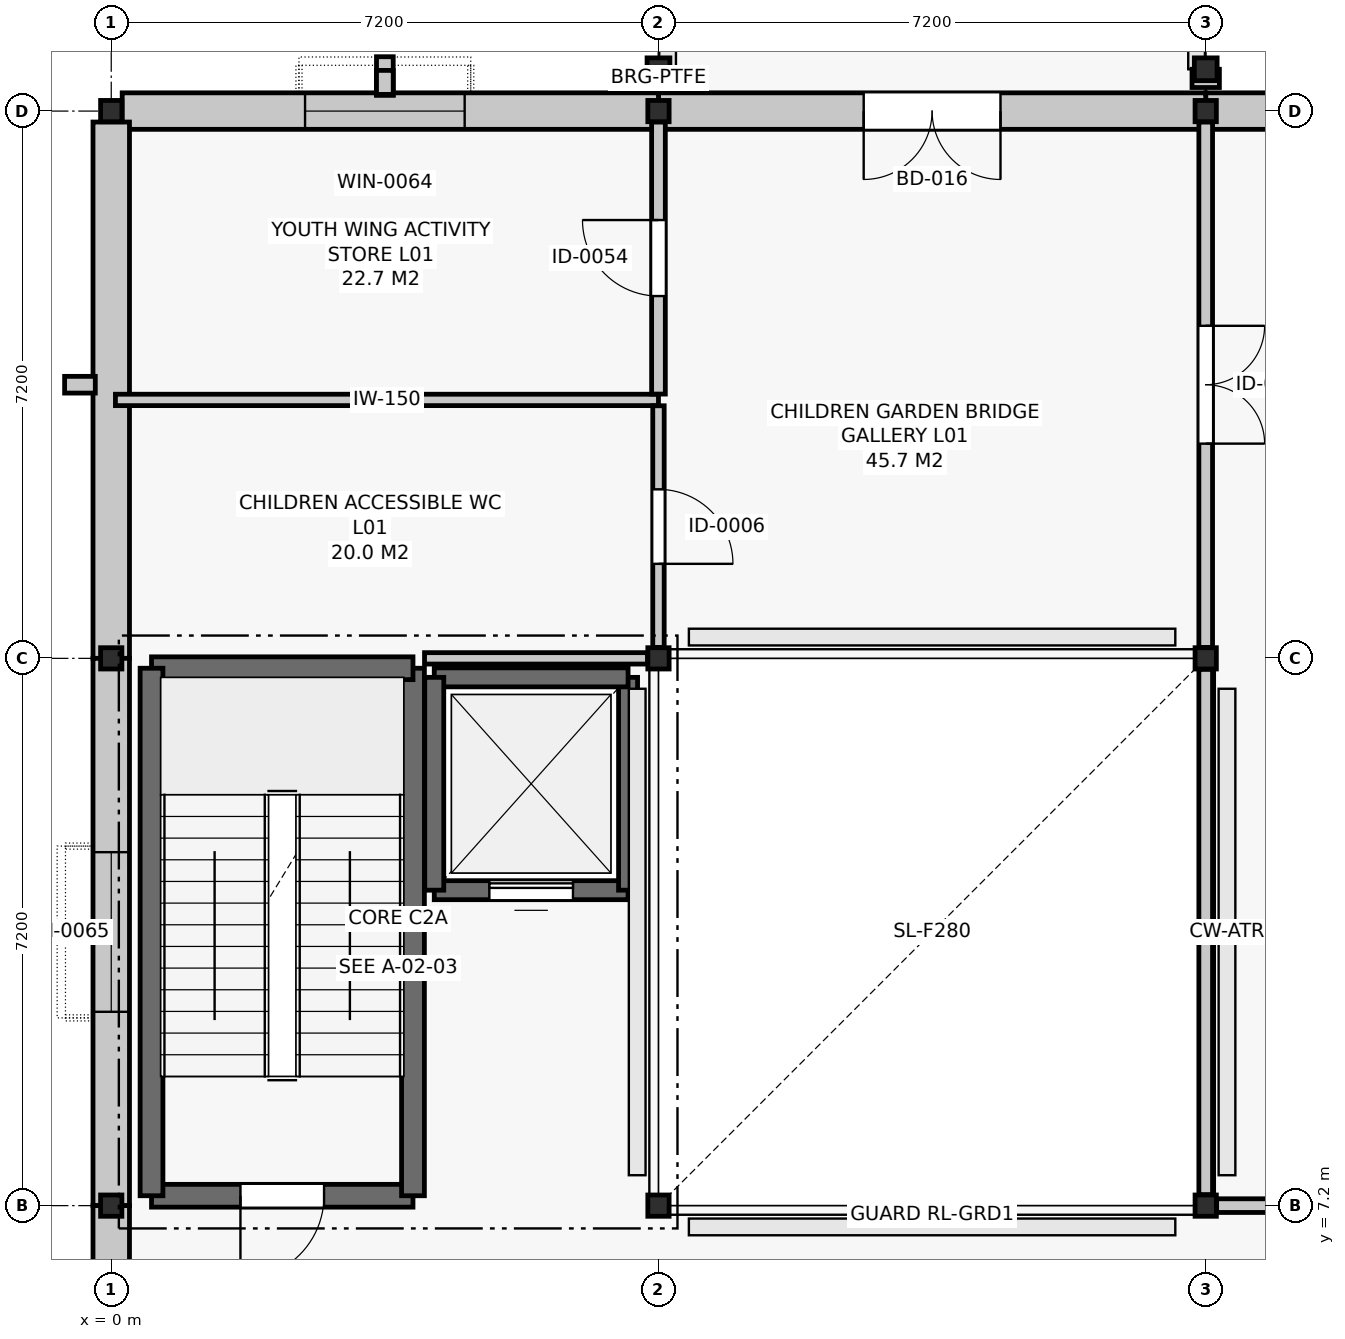
"""IFC4 building model, lengths in metres.
Left out: names, types, materials, properties, quantities, classifications, styles, units other than length and angle.
Written with IfcOpenShell. Run it as: python <this file> out.ifc"""

import sys

from ifc_helpers import new_model, si_unit, direction, frame, frame_2d, origin, origin_2d, place, context, subcontext, project, spatial, rectangle, i_section, extrude, element, fill, save


model = new_model("IFC4")
c1 = context("Model", 3, precision=1e-05, world=origin(), true_north=direction((0.0, 1.0)))
c2 = subcontext(c1, "Body", "Model", "MODEL_VIEW")
j1 = project(units=[si_unit("LENGTHUNIT", "METRE"), si_unit("PLANEANGLEUNIT", "RADIAN")], contexts=[c1])
p1 = place(None, origin())
s1 = spatial("IfcSite", under=j1, at=p1, CompositionType="ELEMENT")
p2 = place(p1, origin())
s2 = spatial("IfcBuilding", under=s1, at=p2, CompositionType="ELEMENT")
p3 = place(p2, frame((0.0, 0.0, 5.4)))
s3 = spatial("IfcBuildingStorey", under=s2, at=p3, CompositionType="ELEMENT", Elevation=5.4)
for number, where, z_axis, x_axis in (
    (1, (0.0, 7.2, 0.0), (0.0, 0.0, 1.0), (1.0, 0.0, 0.0)),
    (2, (0.0, 14.4, 0.0), (0.0, 0.0, 1.0), (1.0, 0.0, 0.0)),
    (3, (0.0, 21.6, 0.0), (0.0, 0.0, 1.0), (1.0, 0.0, 0.0)),
    (4, (7.2, 7.2, 0.0), (0.0, 0.0, 1.0), (1.0, 0.0, 0.0)),
    (5, (7.2, 14.4, 0.0), (0.0, 0.0, 1.0), (1.0, 0.0, 0.0)),
    (6, (7.2, 21.6, 0.0), (0.0, 0.0, 1.0), (1.0, 0.0, 0.0)),
    (7, (14.4, 7.2, 0.0), (0.0, 0.0, 1.0), (1.0, 0.0, 0.0)),
    (8, (14.4, 14.4, 0.0), (0.0, 0.0, 1.0), (1.0, 0.0, 0.0)),
    (9, (14.4, 21.6, 0.0), (0.0, 0.0, 1.0), (1.0, 0.0, 0.0)),
):
    element("IfcColumn", number, at=place(p3, frame(where, z_axis=z_axis, x_axis=x_axis)), inside=s3, PredefinedType="COLUMN", context=c2, shape_type="SweptSolid", body=[
        extrude(i_section(OverallWidth=0.28, OverallDepth=0.28, WebThickness=0.01, FlangeThickness=0.018, FilletRadius=0.024, at=origin_2d()), origin(), (0.0, 0.0, 1.0), 4.8),
    ])
for number, where, z_axis, x_axis in (
    (10, (7.2, 22.15, 0.0), (0.0, 0.0, 1.0), (1.0, 0.0, 0.0)),
    (11, (14.4, 22.15, 0.0), (0.0, 0.0, 1.0), (1.0, 0.0, 0.0)),
):
    element("IfcColumn", number, at=place(p3, frame(where, z_axis=z_axis, x_axis=x_axis)), inside=s3, PredefinedType="COLUMN", context=c2, shape_type="SweptSolid", body=[
        extrude(i_section(OverallWidth=0.3, OverallDepth=0.3, WebThickness=0.011, FlangeThickness=0.019, FilletRadius=0.027, at=origin_2d()), origin(), (0.0, 0.0, 1.0), 4.8),
    ])
p4 = place(p3, frame((21.6, 21.6, 0.0), z_axis=(0.0, 0.0, 1.0), x_axis=(-1.0, 0.0, 0.0)))
e12 = element("IfcWall", 12, at=p4, inside=s3, PredefinedType="SOLIDWALL", context=c2, shape_type="SweptSolid", body=[
    extrude(rectangle(XDim=7.2, YDim=0.48, at=frame_2d((3.6, 0.0))), origin(), (0.0, 0.0, 1.0), 3.8),
])
p5 = place(p4, frame((2.55, 0.0, 0.9)))
e13 = element("IfcOpeningElement", 13, at=p5, cuts=e12, PredefinedType="OPENING", context=c2, shape_type="SweptSolid", body=[
    extrude(rectangle(XDim=2.1, YDim=2.1, at=frame_2d((1.05, 1.05))), frame((0.0, 0.252, 0.0), z_axis=(0.0, -1.0, 0.0), x_axis=(1.0, 0.0, 0.0)), (0.0, 0.0, 1.0), 0.504),
])
p6 = place(p3, frame((14.4, 21.6, 0.0), z_axis=(0.0, 0.0, 1.0), x_axis=(-1.0, 0.0, 0.0)))
e14 = element("IfcWall", 14, at=p6, inside=s3, PredefinedType="SOLIDWALL", context=c2, shape_type="SweptSolid", body=[
    extrude(rectangle(XDim=7.2, YDim=0.48, at=frame_2d((3.6, 0.0))), origin(), (0.0, 0.0, 1.0), 3.8),
])
p7 = place(p6, frame((2.7, 0.0, 0.0)))
e15 = element("IfcOpeningElement", 15, at=p7, cuts=e14, PredefinedType="OPENING", context=c2, shape_type="SweptSolid", body=[
    extrude(rectangle(XDim=1.8, YDim=2.3, at=frame_2d((0.9, 1.15))), frame((0.0, 0.252, 0.0), z_axis=(0.0, -1.0, 0.0), x_axis=(1.0, 0.0, 0.0)), (0.0, 0.0, 1.0), 0.504),
])
p8 = place(p3, frame((7.2, 21.6, 0.0), z_axis=(0.0, 0.0, 1.0), x_axis=(-1.0, 0.0, 0.0)))
e16 = element("IfcWall", 16, at=p8, inside=s3, PredefinedType="SOLIDWALL", context=c2, shape_type="SweptSolid", body=[
    extrude(rectangle(XDim=7.056, YDim=0.48, at=frame_2d((3.528, 0.0))), origin(), (0.0, 0.0, 1.0), 3.8),
])
p9 = place(p8, frame((2.55, 0.0, 0.9)))
e17 = element("IfcOpeningElement", 17, at=p9, cuts=e16, PredefinedType="OPENING", context=c2, shape_type="SweptSolid", body=[
    extrude(rectangle(XDim=2.1, YDim=2.1, at=frame_2d((1.05, 1.05))), frame((0.0, 0.252, 0.0), z_axis=(0.0, -1.0, 0.0), x_axis=(1.0, 0.0, 0.0)), (0.0, 0.0, 1.0), 0.504),
])
p10 = place(p3, frame((0.0, 21.456, 0.0), z_axis=(0.0, 0.0, 1.0), x_axis=(0.0, -1.0, 0.0)))
e18 = element("IfcWall", 18, at=p10, inside=s3, PredefinedType="SOLIDWALL", context=c2, shape_type="SweptSolid", body=[
    extrude(rectangle(XDim=7.056, YDim=0.48, at=frame_2d((3.528, 0.0))), origin(), (0.0, 0.0, 1.0), 3.8),
])
p11 = place(p3, frame((0.0, 14.4, 0.0), z_axis=(0.0, 0.0, 1.0), x_axis=(0.0, -1.0, 0.0)))
e19 = element("IfcWall", 19, at=p11, inside=s3, PredefinedType="SOLIDWALL", context=c2, shape_type="SweptSolid", body=[
    extrude(rectangle(XDim=7.2, YDim=0.48, at=frame_2d((3.6, 0.0))), origin(), (0.0, 0.0, 1.0), 3.8),
])
p12 = place(p11, frame((2.55, 0.0, 0.9)))
e20 = element("IfcOpeningElement", 20, at=p12, cuts=e19, PredefinedType="OPENING", context=c2, shape_type="SweptSolid", body=[
    extrude(rectangle(XDim=2.1, YDim=2.1, at=frame_2d((1.05, 1.05))), frame((0.0, 0.252, 0.0), z_axis=(0.0, -1.0, 0.0), x_axis=(1.0, 0.0, 0.0)), (0.0, 0.0, 1.0), 0.504),
])
p13 = place(p3, frame((0.0, 7.2, 0.0), z_axis=(0.0, 0.0, 1.0), x_axis=(0.0, -1.0, 0.0)))
e21 = element("IfcWall", 21, at=p13, inside=s3, PredefinedType="SOLIDWALL", context=c2, shape_type="SweptSolid", body=[
    extrude(rectangle(XDim=7.056, YDim=0.48, at=frame_2d((3.528, 0.0))), origin(), (0.0, 0.0, 1.0), 3.8),
])
p14 = place(p13, frame((2.55, 0.0, 0.9)))
e22 = element("IfcOpeningElement", 22, at=p14, cuts=e21, PredefinedType="OPENING", context=c2, shape_type="SweptSolid", body=[
    extrude(rectangle(XDim=2.1, YDim=2.1, at=frame_2d((1.05, 1.05))), frame((0.0, 0.252, 0.0), z_axis=(0.0, -1.0, 0.0), x_axis=(1.0, 0.0, 0.0)), (0.0, 0.0, 1.0), 0.504),
])
p15 = place(p3, frame((0.53, 7.33, 0.0), z_axis=(0.0, 0.0, 1.0), x_axis=(1.0, 0.0, 0.0)))
e23 = element("IfcWall", 23, at=p15, inside=s3, PredefinedType="SHEAR", context=c2, shape_type="SweptSolid", body=[
    extrude(rectangle(XDim=3.44, YDim=0.3, at=frame_2d((1.72, 0.0))), origin(), (0.0, 0.0, 1.0), 4.52),
])
p16 = place(p15, frame((1.17, 0.0, 0.0)))
e24 = element("IfcOpeningElement", 24, at=p16, cuts=e23, PredefinedType="OPENING", context=c2, shape_type="SweptSolid", body=[
    extrude(rectangle(XDim=1.1, YDim=2.15, at=frame_2d((0.55, 1.075))), frame((0.0, 0.162, 0.0), z_axis=(0.0, -1.0, 0.0), x_axis=(1.0, 0.0, 0.0)), (0.0, 0.0, 1.0), 0.324),
])
p17 = place(p3, frame((3.97, 7.33, 0.0), z_axis=(0.0, 0.0, 1.0), x_axis=(0.0, 1.0, 0.0)))
e25 = element("IfcWall", 25, at=p17, inside=s3, PredefinedType="SHEAR", context=c2, shape_type="SweptSolid", body=[
    extrude(rectangle(XDim=6.94, YDim=0.3, at=frame_2d((3.47, 0.0))), origin(), (0.0, 0.0, 1.0), 4.52),
])
p18 = place(p3, frame((3.97, 14.27, 0.0), z_axis=(0.0, 0.0, 1.0), x_axis=(-1.0, 0.0, 0.0)))
e26 = element("IfcWall", 26, at=p18, inside=s3, PredefinedType="SHEAR", context=c2, shape_type="SweptSolid", body=[
    extrude(rectangle(XDim=3.44, YDim=0.3, at=frame_2d((1.72, 0.0))), origin(), (0.0, 0.0, 1.0), 4.52),
])
p19 = place(p3, frame((0.53, 14.27, 0.0), z_axis=(0.0, 0.0, 1.0), x_axis=(0.0, -1.0, 0.0)))
e27 = element("IfcWall", 27, at=p19, inside=s3, PredefinedType="SHEAR", context=c2, shape_type="SweptSolid", body=[
    extrude(rectangle(XDim=6.94, YDim=0.3, at=frame_2d((3.47, 0.0))), origin(), (0.0, 0.0, 1.0), 4.52),
])
p20 = place(p3, frame((4.25, 11.35, 0.0), z_axis=(0.0, 0.0, 1.0), x_axis=(1.0, 0.0, 0.0)))
e28 = element("IfcWall", 28, at=p20, inside=s3, PredefinedType="SHEAR", context=c2, shape_type="SweptSolid", body=[
    extrude(rectangle(XDim=2.55, YDim=0.25, at=frame_2d((1.275, 0.0))), origin(), (0.0, 0.0, 1.0), 4.52),
])
p21 = place(p20, frame((0.725, 0.0, 0.0)))
e29 = element("IfcOpeningElement", 29, at=p21, cuts=e28, PredefinedType="OPENING", context=c2, shape_type="SweptSolid", body=[
    extrude(rectangle(XDim=1.1, YDim=2.1, at=frame_2d((0.55, 1.05))), frame((0.0, 0.137, 0.0), z_axis=(0.0, -1.0, 0.0), x_axis=(1.0, 0.0, 0.0)), (0.0, 0.0, 1.0), 0.274),
])
p22 = place(p3, frame((6.8, 11.35, 0.0), z_axis=(0.0, 0.0, 1.0), x_axis=(0.0, 1.0, 0.0)))
e30 = element("IfcWall", 30, at=p22, inside=s3, PredefinedType="SHEAR", context=c2, shape_type="SweptSolid", body=[
    extrude(rectangle(XDim=2.8, YDim=0.25, at=frame_2d((1.4, 0.0))), origin(), (0.0, 0.0, 1.0), 4.52),
])
p23 = place(p3, frame((6.8, 14.15, 0.0), z_axis=(0.0, 0.0, 1.0), x_axis=(-1.0, 0.0, 0.0)))
e31 = element("IfcWall", 31, at=p23, inside=s3, PredefinedType="SHEAR", context=c2, shape_type="SweptSolid", body=[
    extrude(rectangle(XDim=2.55, YDim=0.25, at=frame_2d((1.275, 0.0))), origin(), (0.0, 0.0, 1.0), 4.52),
])
p24 = place(p3, frame((4.25, 14.15, 0.0), z_axis=(0.0, 0.0, 1.0), x_axis=(0.0, -1.0, 0.0)))
e32 = element("IfcWall", 32, at=p24, inside=s3, PredefinedType="SHEAR", context=c2, shape_type="SweptSolid", body=[
    extrude(rectangle(XDim=2.8, YDim=0.25, at=frame_2d((1.4, 0.0))), origin(), (0.0, 0.0, 1.0), 4.52),
])
p25 = place(p3, frame((4.122, 14.4, 0.0), z_axis=(0.0, 0.0, 1.0), x_axis=(1.0, 0.0, 0.0)))
e33 = element("IfcWall", 33, at=p25, inside=s3, PredefinedType="PARTITIONING", context=c2, shape_type="SweptSolid", body=[
    extrude(rectangle(XDim=2.934, YDim=0.15, at=frame_2d((1.467, 0.0))), origin(), (0.0, 0.0, 1.0), 4.065),
])
p26 = place(p3, frame((0.055, 17.8, 0.0), z_axis=(0.0, 0.0, 1.0), x_axis=(1.0, 0.0, 0.0)))
e34 = element("IfcWall", 34, at=p26, inside=s3, PredefinedType="PARTITIONING", context=c2, shape_type="SweptSolid", body=[
    extrude(rectangle(XDim=7.145, YDim=0.15, at=frame_2d((3.573, 0.0))), origin(), (0.0, 0.0, 1.0), 3.955),
])
p27 = place(p3, frame((14.544, 7.2, 0.0), z_axis=(0.0, 0.0, 1.0), x_axis=(1.0, 0.0, 0.0)))
e35 = element("IfcWall", 35, at=p27, inside=s3, PredefinedType="PARTITIONING", context=c2, shape_type="SweptSolid", body=[
    extrude(rectangle(XDim=6.912, YDim=0.18, at=frame_2d((3.456, 0.0))), origin(), (0.0, 0.0, 1.0), 4.005),
])
p28 = place(p3, frame((7.2, 14.544, 0.0), z_axis=(0.0, 0.0, 1.0), x_axis=(0.0, 1.0, 0.0)))
e36 = element("IfcWall", 36, at=p28, inside=s3, PredefinedType="PARTITIONING", context=c2, shape_type="SweptSolid", body=[
    extrude(rectangle(XDim=3.179, YDim=0.15, at=frame_2d((1.589, 0.0))), origin(), (0.0, 0.0, 1.0), 4.065),
])
p29 = place(p28, frame((1.1, 0.0, 0.0)))
e37 = element("IfcOpeningElement", 37, at=p29, cuts=e36, PredefinedType="OPENING", context=c2, shape_type="SweptSolid", body=[
    extrude(rectangle(XDim=0.98, YDim=2.1, at=frame_2d((0.49, 1.05))), frame((0.0, 0.087, 0.0), z_axis=(0.0, -1.0, 0.0), x_axis=(1.0, 0.0, 0.0)), (0.0, 0.0, 1.0), 0.174),
])
p30 = place(p3, frame((7.2, 17.877, 0.0), z_axis=(0.0, 0.0, 1.0), x_axis=(0.0, 1.0, 0.0)))
e38 = element("IfcWall", 38, at=p30, inside=s3, PredefinedType="PARTITIONING", context=c2, shape_type="SweptSolid", body=[
    extrude(rectangle(XDim=3.579, YDim=0.18, at=frame_2d((1.79, 0.0))), origin(), (0.0, 0.0, 1.0), 4.065),
])
p31 = place(p30, frame((1.29, 0.0, 0.0)))
e39 = element("IfcOpeningElement", 39, at=p31, cuts=e38, PredefinedType="OPENING", context=c2, shape_type="SweptSolid", body=[
    extrude(rectangle(XDim=1.0, YDim=2.15, at=frame_2d((0.5, 1.075))), frame((0.0, 0.102, 0.0), z_axis=(0.0, -1.0, 0.0), x_axis=(1.0, 0.0, 0.0)), (0.0, 0.0, 1.0), 0.204),
])
p32 = place(p3, frame((14.4, 7.344, 0.0), z_axis=(0.0, 0.0, 1.0), x_axis=(0.0, 1.0, 0.0)))
e40 = element("IfcWall", 40, at=p32, inside=s3, PredefinedType="PARTITIONING", context=c2, shape_type="SweptSolid", body=[
    extrude(rectangle(XDim=6.912, YDim=0.18, at=frame_2d((3.456, 0.0))), origin(), (0.0, 0.0, 1.0), 4.065),
])
p33 = place(p3, frame((14.4, 14.544, 0.0), z_axis=(0.0, 0.0, 1.0), x_axis=(0.0, 1.0, 0.0)))
e41 = element("IfcWall", 41, at=p33, inside=s3, PredefinedType="PARTITIONING", context=c2, shape_type="SweptSolid", body=[
    extrude(rectangle(XDim=6.912, YDim=0.18, at=frame_2d((3.456, 0.0))), origin(), (0.0, 0.0, 1.0), 4.065),
])
p34 = place(p33, frame((2.681, 0.0, 0.0)))
e42 = element("IfcOpeningElement", 42, at=p34, cuts=e41, PredefinedType="OPENING", context=c2, shape_type="SweptSolid", body=[
    extrude(rectangle(XDim=1.55, YDim=2.2, at=frame_2d((0.775, 1.1))), frame((0.0, 0.102, 0.0), z_axis=(0.0, -1.0, 0.0), x_axis=(1.0, 0.0, 0.0)), (0.0, 0.0, 1.0), 0.204),
])
p35 = place(p7, origin())
e43 = element("IfcDoor", 43, at=p35, inside=s3, OperationType="DOUBLE_DOOR_SINGLE_SWING", PredefinedType="DOOR", context=c2, shape_type="SweptSolid", body=[
    extrude(rectangle(XDim=1.8, YDim=2.3, at=frame_2d((0.9, 1.15))), frame((0.0, 0.025, 0.0), z_axis=(0.0, -1.0, 0.0), x_axis=(1.0, 0.0, 0.0)), (0.0, 0.0, 1.0), 0.05),
])
fill(e15, e43)
p36 = place(p9, origin())
e44 = element("IfcWindow", 44, at=p36, inside=s3, PartitioningType="SINGLE_PANEL", PredefinedType="WINDOW", context=c2, shape_type="SweptSolid", body=[
    extrude(rectangle(XDim=2.1, YDim=2.1, at=frame_2d((1.05, 1.05))), frame((0.0, 0.03, 0.0), z_axis=(0.0, -1.0, 0.0), x_axis=(1.0, 0.0, 0.0)), (0.0, 0.0, 1.0), 0.06),
])
fill(e17, e44)
p37 = place(p12, origin())
e45 = element("IfcWindow", 45, at=p37, inside=s3, PartitioningType="SINGLE_PANEL", PredefinedType="WINDOW", context=c2, shape_type="SweptSolid", body=[
    extrude(rectangle(XDim=2.1, YDim=2.1, at=frame_2d((1.05, 1.05))), frame((0.0, 0.03, 0.0), z_axis=(0.0, -1.0, 0.0), x_axis=(1.0, 0.0, 0.0)), (0.0, 0.0, 1.0), 0.06),
])
fill(e20, e45)
p38 = place(p16, frame((1.1, 0.0, 0.0), z_axis=(0.0, 0.0, 1.0), x_axis=(-1.0, 0.0, 0.0)))
e46 = element("IfcDoor", 46, at=p38, inside=s3, OperationType="SINGLE_SWING_RIGHT", PredefinedType="DOOR", context=c2, shape_type="SweptSolid", body=[
    extrude(rectangle(XDim=1.1, YDim=2.15, at=frame_2d((0.55, 1.075))), frame((0.0, 0.025, 0.0), z_axis=(0.0, -1.0, 0.0), x_axis=(1.0, 0.0, 0.0)), (0.0, 0.0, 1.0), 0.05),
])
fill(e24, e46)
p39 = place(p21, origin())
e47 = element("IfcDoor", 47, at=p39, inside=s3, OperationType="SLIDING_TO_LEFT", PredefinedType="DOOR", context=c2, shape_type="SweptSolid", body=[
    extrude(rectangle(XDim=1.1, YDim=2.1, at=frame_2d((0.55, 1.05))), frame((0.0, 0.025, 0.0), z_axis=(0.0, -1.0, 0.0), x_axis=(1.0, 0.0, 0.0)), (0.0, 0.0, 1.0), 0.05),
])
fill(e29, e47)
p40 = place(p29, frame((0.98, 0.0, 0.0), z_axis=(0.0, 0.0, 1.0), x_axis=(-1.0, 0.0, 0.0)))
e48 = element("IfcDoor", 48, at=p40, inside=s3, OperationType="SINGLE_SWING_RIGHT", PredefinedType="DOOR", context=c2, shape_type="SweptSolid", body=[
    extrude(rectangle(XDim=0.98, YDim=2.1, at=frame_2d((0.49, 1.05))), frame((0.0, 0.025, 0.0), z_axis=(0.0, -1.0, 0.0), x_axis=(1.0, 0.0, 0.0)), (0.0, 0.0, 1.0), 0.05),
])
fill(e37, e48)
p41 = place(p31, origin())
e49 = element("IfcDoor", 49, at=p41, inside=s3, OperationType="SINGLE_SWING_RIGHT", PredefinedType="DOOR", context=c2, shape_type="SweptSolid", body=[
    extrude(rectangle(XDim=1.0, YDim=2.15, at=frame_2d((0.5, 1.075))), frame((0.0, 0.025, 0.0), z_axis=(0.0, -1.0, 0.0), x_axis=(1.0, 0.0, 0.0)), (0.0, 0.0, 1.0), 0.05),
])
fill(e39, e49)
p42 = place(p34, frame((1.55, 0.0, 0.0), z_axis=(0.0, 0.0, 1.0), x_axis=(-1.0, 0.0, 0.0)))
e50 = element("IfcDoor", 50, at=p42, inside=s3, OperationType="DOUBLE_DOOR_SINGLE_SWING", PredefinedType="DOOR", context=c2, shape_type="SweptSolid", body=[
    extrude(rectangle(XDim=1.55, YDim=2.2, at=frame_2d((0.775, 1.1))), frame((0.0, 0.025, 0.0), z_axis=(0.0, -1.0, 0.0), x_axis=(1.0, 0.0, 0.0)), (0.0, 0.0, 1.0), 0.05),
])
fill(e42, e50)
save(model, sys.argv[1])
